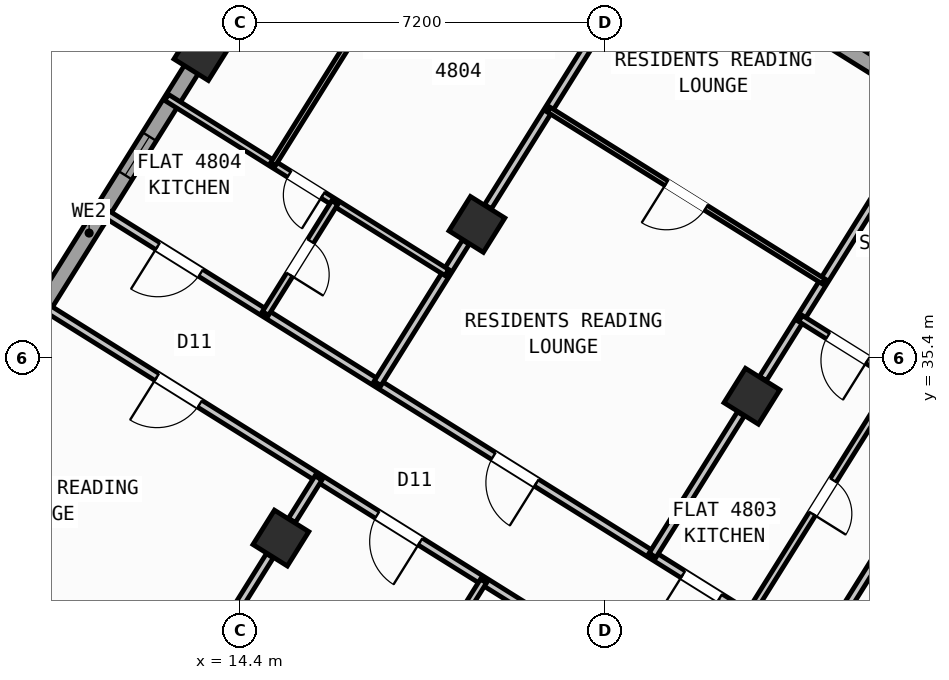
"""IFC4 building model, lengths in metres.
Left out: names, types, materials, properties, quantities, classifications, styles, units other than length and angle.
Written with IfcOpenShell. Run it as: python <this file> out.ifc"""

import sys

from ifc_helpers import new_model, si_unit, direction, frame, frame_2d, origin, origin_2d, place, context, subcontext, project, spatial, rectangle, hollow_rectangle, extrude, source, transform, mapped, element, fill, save


model = new_model("IFC4")
c1 = context("Model", 3, precision=1e-05, world=origin(), true_north=direction((0.0, 1.0)))
c2 = subcontext(c1, "Body", "Model", "MODEL_VIEW")
j1 = project(units=[si_unit("LENGTHUNIT", "METRE"), si_unit("PLANEANGLEUNIT", "RADIAN")], contexts=[c1])
p1 = place(None, origin())
s1 = spatial("IfcSite", under=j1, at=p1, CompositionType="ELEMENT")
p2 = place(p1, origin())
s2 = spatial("IfcBuilding", under=s1, at=p2, CompositionType="ELEMENT")
p3 = place(p2, frame((0.0, 0.0, 191.4)))
s3 = spatial("IfcBuildingStorey", under=s2, at=p3, CompositionType="ELEMENT", Elevation=191.4)
m1 = source(origin(), c2, "Body", "SweptSolid", [
    extrude(hollow_rectangle(XDim=0.8, YDim=0.8, WallThickness=0.032, at=origin_2d()), origin(), (0.0, 0.0, 1.0), 3.6),
])
for number, where, z_axis, x_axis in (
    (1, (24.5, 34.643, 0.0), (0.0, 0.0, 1.0), (-0.848, 0.53, 0.0)),
    (2, (19.073, 38.034, 0.0), (0.0, 0.0, 1.0), (-0.848, 0.53, 0.0)),
    (3, (15.205, 31.844, 0.0), (0.0, 0.0, 1.0), (-0.848, 0.53, 0.0)),
    (4, (13.646, 41.426, 0.0), (0.0, 0.0, 1.0), (-0.848, 0.53, 0.0)),
):
    element("IfcColumn", number, at=place(p3, frame(where, z_axis=z_axis, x_axis=x_axis)), inside=s3, PredefinedType="COLUMN", context=c2, shape_type="MappedRepresentation", body=[
        mapped(m1, transform((0.0, 0.0, 0.0), scale=1.0)),
    ])
p4 = place(p3, frame((5.7, 28.71, 0.0), z_axis=(0.0, 0.0, 1.0), x_axis=(0.529923711467, 0.8480453172, 0.0)))
e5 = element("IfcWall", 5, at=p4, inside=s3, PredefinedType="STANDARD", context=c2, shape_type="SweptSolid", body=[
    extrude(rectangle(XDim=21.587, YDim=0.32, at=frame_2d((10.794, 0.0))), origin(), (0.0, 0.0, 1.0), 2.795),
])
p5 = place(p4, frame((1.44, 0.0, 0.95)))
e6 = element("IfcOpeningElement", 6, at=p5, cuts=e5, PredefinedType="OPENING", context=c2, shape_type="SweptSolid", body=[
    extrude(rectangle(XDim=1.2, YDim=1.4, at=frame_2d((0.6, 0.7))), frame((0.0, 0.17, 0.0), z_axis=(0.0, -1.0, 0.0), x_axis=(1.0, 0.0, 0.0)), (0.0, 0.0, 1.0), 0.34),
])
p6 = place(p4, frame((4.545, 0.0, 0.85)))
e7 = element("IfcOpeningElement", 7, at=p6, cuts=e5, PredefinedType="OPENING", context=c2, shape_type="SweptSolid", body=[
    extrude(rectangle(XDim=1.8, YDim=1.5, at=frame_2d((0.9, 0.75))), frame((0.0, 0.17, 0.0), z_axis=(0.0, -1.0, 0.0), x_axis=(1.0, 0.0, 0.0)), (0.0, 0.0, 1.0), 0.34),
])
p7 = place(p4, frame((12.139, 0.0, 1.0)))
e8 = element("IfcOpeningElement", 8, at=p7, cuts=e5, PredefinedType="OPENING", context=c2, shape_type="SweptSolid", body=[
    extrude(rectangle(XDim=0.9, YDim=1.25, at=frame_2d((0.45, 0.625))), frame((0.0, 0.17, 0.0), z_axis=(0.0, -1.0, 0.0), x_axis=(1.0, 0.0, 0.0)), (0.0, 0.0, 1.0), 0.34),
])
p8 = place(p4, frame((16.35, 0.0, 0.95)))
e9 = element("IfcOpeningElement", 9, at=p8, cuts=e5, PredefinedType="OPENING", context=c2, shape_type="SweptSolid", body=[
    extrude(rectangle(XDim=1.2, YDim=1.4, at=frame_2d((0.6, 0.7))), frame((0.0, 0.17, 0.0), z_axis=(0.0, -1.0, 0.0), x_axis=(1.0, 0.0, 0.0)), (0.0, 0.0, 1.0), 0.34),
])
p9 = place(p4, frame((18.762, 0.0, 0.95)))
e10 = element("IfcOpeningElement", 10, at=p9, cuts=e5, PredefinedType="OPENING", context=c2, shape_type="SweptSolid", body=[
    extrude(rectangle(XDim=1.2, YDim=1.4, at=frame_2d((0.6, 0.7))), frame((0.0, 0.17, 0.0), z_axis=(0.0, -1.0, 0.0), x_axis=(1.0, 0.0, 0.0)), (0.0, 0.0, 1.0), 0.34),
])
p10 = place(p3, frame((17.424, 47.083, 0.0), z_axis=(0.0, 0.0, 1.0), x_axis=(0.848049927979, -0.529916332693, 0.0)))
e11 = element("IfcWall", 11, at=p10, inside=s3, PredefinedType="STANDARD", context=c2, shape_type="SweptSolid", body=[
    extrude(rectangle(XDim=29.223, YDim=0.32, at=frame_2d((14.612, 0.0))), origin(), (0.0, 0.0, 1.0), 3.32),
])
p11 = place(p10, frame((3.764, 0.0, 0.0)))
e12 = element("IfcOpeningElement", 12, at=p11, cuts=e11, PredefinedType="OPENING", context=c2, shape_type="SweptSolid", body=[
    extrude(rectangle(XDim=1.05, YDim=2.15, at=frame_2d((0.525, 1.075))), frame((0.0, 0.17, 0.0), z_axis=(0.0, -1.0, 0.0), x_axis=(1.0, 0.0, 0.0)), (0.0, 0.0, 1.0), 0.34),
])
p12 = place(p10, frame((8.344, 0.0, 0.8)))
e13 = element("IfcOpeningElement", 13, at=p12, cuts=e11, PredefinedType="OPENING", context=c2, shape_type="SweptSolid", body=[
    extrude(rectangle(XDim=2.1, YDim=1.55, at=frame_2d((1.05, 0.775))), frame((0.0, 0.17, 0.0), z_axis=(0.0, -1.0, 0.0), x_axis=(1.0, 0.0, 0.0)), (0.0, 0.0, 1.0), 0.34),
])
p13 = place(p10, frame((13.589, 0.0, 0.85)))
e14 = element("IfcOpeningElement", 14, at=p13, cuts=e11, PredefinedType="OPENING", context=c2, shape_type="SweptSolid", body=[
    extrude(rectangle(XDim=1.8, YDim=1.5, at=frame_2d((0.9, 0.75))), frame((0.0, 0.17, 0.0), z_axis=(0.0, -1.0, 0.0), x_axis=(1.0, 0.0, 0.0)), (0.0, 0.0, 1.0), 0.34),
])
p14 = place(p10, frame((17.104, 0.0, 0.95)))
e15 = element("IfcOpeningElement", 15, at=p14, cuts=e11, PredefinedType="OPENING", context=c2, shape_type="SweptSolid", body=[
    extrude(rectangle(XDim=1.2, YDim=1.4, at=frame_2d((0.6, 0.7))), frame((0.0, 0.17, 0.0), z_axis=(0.0, -1.0, 0.0), x_axis=(1.0, 0.0, 0.0)), (0.0, 0.0, 1.0), 0.34),
])
p15 = place(p10, frame((21.214, 0.0, 0.95)))
e16 = element("IfcOpeningElement", 16, at=p15, cuts=e11, PredefinedType="OPENING", context=c2, shape_type="SweptSolid", body=[
    extrude(rectangle(XDim=1.2, YDim=1.4, at=frame_2d((0.6, 0.7))), frame((0.0, 0.17, 0.0), z_axis=(0.0, -1.0, 0.0), x_axis=(1.0, 0.0, 0.0)), (0.0, 0.0, 1.0), 0.34),
])
p16 = place(p10, frame((25.853, 0.0, 0.95)))
e17 = element("IfcOpeningElement", 17, at=p16, cuts=e11, PredefinedType="OPENING", context=c2, shape_type="SweptSolid", body=[
    extrude(rectangle(XDim=1.2, YDim=1.4, at=frame_2d((0.6, 0.7))), frame((0.0, 0.17, 0.0), z_axis=(0.0, -1.0, 0.0), x_axis=(1.0, 0.0, 0.0)), (0.0, 0.0, 1.0), 0.34),
])
p17 = place(p3, frame((31.239, 38.274, 0.0), z_axis=(0.0, 0.0, 1.0), x_axis=(-0.529914125013, -0.848051307476, 0.0)))
e18 = element("IfcWall", 18, at=p17, inside=s3, PredefinedType="PARTITIONING", context=c2, shape_type="SweptSolid", body=[
    extrude(rectangle(XDim=10.35, YDim=0.16, at=frame_2d((5.175, 0.0))), origin(), (0.0, 0.0, 1.0), 3.31),
])
p18 = place(p3, frame((25.754, 29.497, 0.0), z_axis=(0.0, 0.0, 1.0), x_axis=(-0.848045850158, 0.529922858565, 0.0)))
e19 = element("IfcWall", 19, at=p18, inside=s3, PredefinedType="PARTITIONING", context=c2, shape_type="SweptSolid", body=[
    extrude(rectangle(XDim=16.73, YDim=0.16, at=frame_2d((8.365, 0.0))), origin(), (0.0, 0.0, 1.0), 3.31),
])
p19 = place(p18, frame((2.22, 0.0, 0.0)))
e20 = element("IfcOpeningElement", 20, at=p19, cuts=e19, PredefinedType="OPENING", context=c2, shape_type="SweptSolid", body=[
    extrude(rectangle(XDim=0.86, YDim=2.05, at=frame_2d((0.43, 1.025))), frame((0.0, 0.09, 0.0), z_axis=(0.0, -1.0, 0.0), x_axis=(1.0, 0.0, 0.0)), (0.0, 0.0, 1.0), 0.18),
])
p20 = place(p18, frame((6.49, 0.0, 0.0)))
e21 = element("IfcOpeningElement", 21, at=p20, cuts=e19, PredefinedType="OPENING", context=c2, shape_type="SweptSolid", body=[
    extrude(rectangle(XDim=1.0, YDim=2.1, at=frame_2d((0.5, 1.05))), frame((0.0, 0.09, 0.0), z_axis=(0.0, -1.0, 0.0), x_axis=(1.0, 0.0, 0.0)), (0.0, 0.0, 1.0), 0.18),
])
p21 = place(p18, frame((14.304, 0.0, 0.0)))
e22 = element("IfcOpeningElement", 22, at=p21, cuts=e19, PredefinedType="OPENING", context=c2, shape_type="SweptSolid", body=[
    extrude(rectangle(XDim=1.0, YDim=2.1, at=frame_2d((0.5, 1.05))), frame((0.0, 0.09, 0.0), z_axis=(0.0, -1.0, 0.0), x_axis=(1.0, 0.0, 0.0)), (0.0, 0.0, 1.0), 0.18),
])
p22 = place(p3, frame((24.588, 27.631, 0.0), z_axis=(0.0, 0.0, 1.0), x_axis=(-0.848041752158, 0.529929416617, 0.0)))
e23 = element("IfcWall", 23, at=p22, inside=s3, PredefinedType="PARTITIONING", context=c2, shape_type="SweptSolid", body=[
    extrude(rectangle(XDim=16.73, YDim=0.16, at=frame_2d((8.365, 0.0))), origin(), (0.0, 0.0, 1.0), 3.31),
])
p23 = place(p22, frame((2.22, 0.0, 0.0)))
e24 = element("IfcOpeningElement", 24, at=p23, cuts=e23, PredefinedType="OPENING", context=c2, shape_type="SweptSolid", body=[
    extrude(rectangle(XDim=0.86, YDim=2.05, at=frame_2d((0.43, 1.025))), frame((0.0, 0.09, 0.0), z_axis=(0.0, -1.0, 0.0), x_axis=(1.0, 0.0, 0.0)), (0.0, 0.0, 1.0), 0.18),
])
p24 = place(p22, frame((7.82, 0.0, 0.0)))
e25 = element("IfcOpeningElement", 25, at=p24, cuts=e23, PredefinedType="OPENING", context=c2, shape_type="SweptSolid", body=[
    extrude(rectangle(XDim=1.0, YDim=2.1, at=frame_2d((0.5, 1.05))), frame((0.0, 0.09, 0.0), z_axis=(0.0, -1.0, 0.0), x_axis=(1.0, 0.0, 0.0)), (0.0, 0.0, 1.0), 0.18),
])
p25 = place(p22, frame((12.95, 0.0, 0.0)))
e26 = element("IfcOpeningElement", 26, at=p25, cuts=e23, PredefinedType="OPENING", context=c2, shape_type="SweptSolid", body=[
    extrude(rectangle(XDim=1.0, YDim=2.1, at=frame_2d((0.5, 1.05))), frame((0.0, 0.09, 0.0), z_axis=(0.0, -1.0, 0.0), x_axis=(1.0, 0.0, 0.0)), (0.0, 0.0, 1.0), 0.18),
])
p26 = place(p3, frame((15.946, 33.031, 0.0), z_axis=(0.0, 0.0, 1.0), x_axis=(-0.529821225456, -0.848109349704, 0.0)))
e27 = element("IfcWall", 27, at=p26, inside=s3, PredefinedType="PARTITIONING", context=c2, shape_type="SweptSolid", body=[
    extrude(rectangle(XDim=0.988, YDim=0.16, at=frame_2d((0.494, 0.0))), origin(), (0.0, 0.0, 1.0), 2.795),
])
p27 = place(p3, frame((14.986, 31.494, 0.0), z_axis=(0.0, 0.0, 1.0), x_axis=(-0.529907440938, -0.848055484057, 0.0)))
e28 = element("IfcWall", 28, at=p27, inside=s3, PredefinedType="PARTITIONING", context=c2, shape_type="SweptSolid", body=[
    extrude(rectangle(XDim=6.476, YDim=0.16, at=frame_2d((3.238, 0.0))), origin(), (0.0, 0.0, 1.0), 2.795),
])
p28 = place(p3, frame((19.203, 30.996, 0.0), z_axis=(0.0, 0.0, 1.0), x_axis=(-0.529906983049, -0.848055770169, 0.0)))
e29 = element("IfcWall", 29, at=p28, inside=s3, PredefinedType="PLUMBINGWALL", context=c2, shape_type="SweptSolid", body=[
    extrude(rectangle(XDim=3.58, YDim=0.14, at=frame_2d((1.79, 0.0))), origin(), (0.0, 0.0, 1.0), 3.31),
])
p29 = place(p28, frame((1.4, 0.0, 0.0)))
e30 = element("IfcOpeningElement", 30, at=p29, cuts=e29, PredefinedType="OPENING", context=c2, shape_type="SweptSolid", body=[
    extrude(rectangle(XDim=0.78, YDim=2.05, at=frame_2d((0.39, 1.025))), frame((0.0, 0.08, 0.0), z_axis=(0.0, -1.0, 0.0), x_axis=(1.0, 0.0, 0.0)), (0.0, 0.0, 1.0), 0.16),
])
p30 = place(p3, frame((12.951, 28.238, 0.0), z_axis=(0.0, 0.0, 1.0), x_axis=(-0.848031959833, 0.529945086874, 0.0)))
e31 = element("IfcWall", 31, at=p30, inside=s3, PredefinedType="PARTITIONING", context=c2, shape_type="SweptSolid", body=[
    extrude(rectangle(XDim=6.52, YDim=0.11, at=frame_2d((3.26, 0.0))), origin(), (0.0, 0.0, 1.0), 3.31),
])
p31 = place(p30, frame((2.8, 0.0, 0.0)))
e32 = element("IfcOpeningElement", 32, at=p31, cuts=e31, PredefinedType="OPENING", context=c2, shape_type="SweptSolid", body=[
    extrude(rectangle(XDim=0.92, YDim=2.08, at=frame_2d((0.46, 1.04))), frame((0.0, 0.065, 0.0), z_axis=(0.0, -1.0, 0.0), x_axis=(1.0, 0.0, 0.0)), (0.0, 0.0, 1.0), 0.13),
])
p32 = place(p3, frame((27.634, 39.657, 0.0), z_axis=(0.0, 0.0, 1.0), x_axis=(-0.529899205623, -0.848060629837, 0.0)))
e33 = element("IfcWall", 33, at=p32, inside=s3, PredefinedType="PARTITIONING", context=c2, shape_type="SweptSolid", body=[
    extrude(rectangle(XDim=5.501, YDim=0.16, at=frame_2d((2.75, 0.0))), origin(), (0.0, 0.0, 1.0), 2.795),
])
p33 = place(p3, frame((24.282, 34.293, 0.0), z_axis=(0.0, 0.0, 1.0), x_axis=(-0.529938869374, -0.84803584519, 0.0)))
e34 = element("IfcWall", 34, at=p33, inside=s3, PredefinedType="PARTITIONING", context=c2, shape_type="SweptSolid", body=[
    extrude(rectangle(XDim=3.288, YDim=0.16, at=frame_2d((1.644, 0.0))), origin(), (0.0, 0.0, 1.0), 2.795),
])
p34 = place(p3, frame((28.674, 34.169, 0.0), z_axis=(0.0, 0.0, 1.0), x_axis=(-0.848059820872, 0.529900500304, 0.0)))
e35 = element("IfcWall", 35, at=p34, inside=s3, PredefinedType="PLUMBINGWALL", context=c2, shape_type="SweptSolid", body=[
    extrude(rectangle(XDim=3.79, YDim=0.14, at=frame_2d((1.895, 0.0))), origin(), (0.0, 0.0, 1.0), 3.31),
])
p35 = place(p34, frame((2.23, 0.0, 0.0)))
e36 = element("IfcOpeningElement", 36, at=p35, cuts=e35, PredefinedType="OPENING", context=c2, shape_type="SweptSolid", body=[
    extrude(rectangle(XDim=0.92, YDim=2.08, at=frame_2d((0.46, 1.04))), frame((0.0, 0.08, 0.0), z_axis=(0.0, -1.0, 0.0), x_axis=(1.0, 0.0, 0.0)), (0.0, 0.0, 1.0), 0.16),
])
p36 = place(p3, frame((27.359, 34.991, 0.0), z_axis=(0.0, 0.0, 1.0), x_axis=(-0.529907329021, -0.848055553988, 0.0)))
e37 = element("IfcWall", 37, at=p36, inside=s3, PredefinedType="PLUMBINGWALL", context=c2, shape_type="SweptSolid", body=[
    extrude(rectangle(XDim=5.51, YDim=0.14, at=frame_2d((2.755, 0.0))), origin(), (0.0, 0.0, 1.0), 2.935),
])
p37 = place(p36, frame((2.365, 0.0, 0.0)))
e38 = element("IfcOpeningElement", 38, at=p37, cuts=e37, PredefinedType="OPENING", context=c2, shape_type="SweptSolid", body=[
    extrude(rectangle(XDim=0.78, YDim=2.05, at=frame_2d((0.39, 1.025))), frame((0.0, 0.08, 0.0), z_axis=(0.0, -1.0, 0.0), x_axis=(1.0, 0.0, 0.0)), (0.0, 0.0, 1.0), 0.16),
])
p38 = place(p3, frame((22.206, 43.049, 0.0), z_axis=(0.0, 0.0, 1.0), x_axis=(-0.529919150083, -0.848048167486, 0.0)))
e39 = element("IfcWall", 39, at=p38, inside=s3, PredefinedType="PARTITIONING", context=c2, shape_type="SweptSolid", body=[
    extrude(rectangle(XDim=5.501, YDim=0.16, at=frame_2d((2.75, 0.0))), origin(), (0.0, 0.0, 1.0), 2.795),
])
p39 = place(p3, frame((18.854, 37.685, 0.0), z_axis=(0.0, 0.0, 1.0), x_axis=(-0.529885466561, -0.848069214349, 0.0)))
e40 = element("IfcWall", 40, at=p39, inside=s3, PredefinedType="PARTITIONING", context=c2, shape_type="SweptSolid", body=[
    extrude(rectangle(XDim=3.288, YDim=0.16, at=frame_2d((1.644, 0.0))), origin(), (0.0, 0.0, 1.0), 2.795),
])
p40 = place(p3, frame((25.916, 36.909, 0.0), z_axis=(0.0, 0.0, 1.0), x_axis=(-0.848056163074, 0.529906354247, 0.0)))
e41 = element("IfcWall", 41, at=p40, inside=s3, PredefinedType="PARTITIONING", context=c2, shape_type="SweptSolid", body=[
    extrude(rectangle(XDim=6.4, YDim=0.11, at=frame_2d((3.2, 0.0))), origin(), (0.0, 0.0, 1.0), 3.31),
])
p41 = place(p40, frame((2.74, 0.0, 0.0)))
e42 = element("IfcOpeningElement", 42, at=p41, cuts=e41, PredefinedType="OPENING", context=c2, shape_type="SweptSolid", body=[
    extrude(rectangle(XDim=0.92, YDim=2.08, at=frame_2d((0.46, 1.04))), frame((0.0, 0.065, 0.0), z_axis=(0.0, -1.0, 0.0), x_axis=(1.0, 0.0, 0.0)), (0.0, 0.0, 1.0), 0.13),
])
p42 = place(p3, frame((18.479, 37.084, 0.0), z_axis=(0.0, 0.0, 1.0), x_axis=(-0.848048787466, 0.529918157905, 0.0)))
e43 = element("IfcWall", 43, at=p42, inside=s3, PredefinedType="PLUMBINGWALL", context=c2, shape_type="SweptSolid", body=[
    extrude(rectangle(XDim=6.52, YDim=0.14, at=frame_2d((3.26, 0.0))), origin(), (0.0, 0.0, 1.0), 3.31),
])
p43 = place(p42, frame((2.885, 0.0, 0.0)))
e44 = element("IfcOpeningElement", 44, at=p43, cuts=e43, PredefinedType="OPENING", context=c2, shape_type="SweptSolid", body=[
    extrude(rectangle(XDim=0.78, YDim=2.05, at=frame_2d((0.39, 1.025))), frame((0.0, 0.08, 0.0), z_axis=(0.0, -1.0, 0.0), x_axis=(1.0, 0.0, 0.0)), (0.0, 0.0, 1.0), 0.16),
])
p44 = place(p3, frame((16.268, 38.467, 0.0), z_axis=(0.0, 0.0, 1.0), x_axis=(-0.529913878929, -0.848051461244, 0.0)))
e45 = element("IfcWall", 45, at=p44, inside=s3, PredefinedType="PLUMBINGWALL", context=c2, shape_type="SweptSolid", body=[
    extrude(rectangle(XDim=2.58, YDim=0.14, at=frame_2d((1.29, 0.0))), origin(), (0.0, 0.0, 1.0), 3.31),
])
p45 = place(p44, frame((0.9, 0.0, 0.0)))
e46 = element("IfcOpeningElement", 46, at=p45, cuts=e45, PredefinedType="OPENING", context=c2, shape_type="SweptSolid", body=[
    extrude(rectangle(XDim=0.78, YDim=2.05, at=frame_2d((0.39, 1.025))), frame((0.0, 0.08, 0.0), z_axis=(0.0, -1.0, 0.0), x_axis=(1.0, 0.0, 0.0)), (0.0, 0.0, 1.0), 0.16),
])
p46 = place(p3, frame((19.312, 46.045, 0.0), z_axis=(0.0, 0.0, 1.0), x_axis=(-0.529933431478, -0.848039243315, 0.0)))
e47 = element("IfcWall", 47, at=p46, inside=s3, PredefinedType="PARTITIONING", context=c2, shape_type="SweptSolid", body=[
    extrude(rectangle(XDim=8.04, YDim=0.11, at=frame_2d((4.02, 0.0))), origin(), (0.0, 0.0, 1.0), 2.935),
])
p47 = place(p46, frame((0.47, 0.0, 0.0)))
e48 = element("IfcOpeningElement", 48, at=p47, cuts=e47, PredefinedType="OPENING", context=c2, shape_type="SweptSolid", body=[
    extrude(rectangle(XDim=0.92, YDim=2.08, at=frame_2d((0.46, 1.04))), frame((0.0, 0.065, 0.0), z_axis=(0.0, -1.0, 0.0), x_axis=(1.0, 0.0, 0.0)), (0.0, 0.0, 1.0), 0.13),
])
m2 = source(origin(), c2, "Body", "SweptSolid", [
    extrude(rectangle(XDim=0.9, YDim=1.25, at=frame_2d((0.45, 0.625))), frame((0.0, 0.03, 0.0), z_axis=(0.0, -1.0, 0.0), x_axis=(1.0, 0.0, 0.0)), (0.0, 0.0, 1.0), 0.06),
])
p48 = place(p7, origin())
e49 = element("IfcWindow", 49, at=p48, inside=s3, PartitioningType="SINGLE_PANEL", PredefinedType="WINDOW", context=c2, shape_type="MappedRepresentation", body=[
    mapped(m2, transform((0.0, 0.0, 0.0), scale=1.0)),
])
fill(e8, e49)
m3 = source(origin(), c2, "Body", "SweptSolid", [
    extrude(rectangle(XDim=1.0, YDim=2.1, at=frame_2d((0.5, 1.05))), frame((0.0, 0.025, 0.0), z_axis=(0.0, -1.0, 0.0), x_axis=(1.0, 0.0, 0.0)), (0.0, 0.0, 1.0), 0.05),
])
p49 = place(p24, origin())
e50 = element("IfcDoor", 50, at=p49, inside=s3, OperationType="SINGLE_SWING_LEFT", PredefinedType="DOOR", context=c2, shape_type="MappedRepresentation", body=[
    mapped(m3, transform((0.0, 0.0, 0.0), scale=1.0)),
])
fill(e25, e50)
p50 = place(p25, origin())
e51 = element("IfcDoor", 51, at=p50, inside=s3, OperationType="SINGLE_SWING_RIGHT", PredefinedType="DOOR", context=c2, shape_type="MappedRepresentation", body=[
    mapped(m3, transform((0.0, 0.0, 0.0), scale=1.0)),
])
fill(e26, e51)
m4 = source(origin(), c2, "Body", "SweptSolid", [
    extrude(rectangle(XDim=0.86, YDim=2.05, at=frame_2d((0.43, 1.025))), frame((0.0, 0.025, 0.0), z_axis=(0.0, -1.0, 0.0), x_axis=(1.0, 0.0, 0.0)), (0.0, 0.0, 1.0), 0.05),
])
p51 = place(p19, origin())
e52 = element("IfcDoor", 52, at=p51, inside=s3, OperationType="SINGLE_SWING_RIGHT", PredefinedType="DOOR", context=c2, shape_type="MappedRepresentation", body=[
    mapped(m4, transform((0.0, 0.0, 0.0), scale=1.0)),
])
fill(e20, e52)
m5 = source(origin(), c2, "Body", "SweptSolid", [
    extrude(rectangle(XDim=0.92, YDim=2.08, at=frame_2d((0.46, 1.04))), frame((0.0, 0.025, 0.0), z_axis=(0.0, -1.0, 0.0), x_axis=(1.0, 0.0, 0.0)), (0.0, 0.0, 1.0), 0.05),
])
p52 = place(p35, origin())
e53 = element("IfcDoor", 53, at=p52, inside=s3, OperationType="SINGLE_SWING_LEFT", PredefinedType="DOOR", context=c2, shape_type="MappedRepresentation", body=[
    mapped(m5, transform((0.0, 0.0, 0.0), scale=1.0)),
])
fill(e36, e53)
m6 = source(origin(), c2, "Body", "SweptSolid", [
    extrude(rectangle(XDim=0.78, YDim=2.05, at=frame_2d((0.39, 1.025))), frame((0.0, 0.025, 0.0), z_axis=(0.0, -1.0, 0.0), x_axis=(1.0, 0.0, 0.0)), (0.0, 0.0, 1.0), 0.05),
])
p53 = place(p37, origin())
e54 = element("IfcDoor", 54, at=p53, inside=s3, OperationType="SINGLE_SWING_RIGHT", PredefinedType="DOOR", context=c2, shape_type="MappedRepresentation", body=[
    mapped(m6, transform((0.0, 0.0, 0.0), scale=1.0)),
])
fill(e38, e54)
p54 = place(p20, origin())
e55 = element("IfcDoor", 55, at=p54, inside=s3, OperationType="SINGLE_SWING_LEFT", PredefinedType="DOOR", context=c2, shape_type="MappedRepresentation", body=[
    mapped(m3, transform((0.0, 0.0, 0.0), scale=1.0)),
])
fill(e21, e55)
p55 = place(p41, origin())
e56 = element("IfcDoor", 56, at=p55, inside=s3, OperationType="SINGLE_SWING_RIGHT", PredefinedType="DOOR", context=c2, shape_type="MappedRepresentation", body=[
    mapped(m5, transform((0.0, 0.0, 0.0), scale=1.0)),
])
fill(e42, e56)
p56 = place(p21, origin())
e57 = element("IfcDoor", 57, at=p56, inside=s3, OperationType="SINGLE_SWING_RIGHT", PredefinedType="DOOR", context=c2, shape_type="MappedRepresentation", body=[
    mapped(m3, transform((0.0, 0.0, 0.0), scale=1.0)),
])
fill(e22, e57)
p57 = place(p43, origin())
e58 = element("IfcDoor", 58, at=p57, inside=s3, OperationType="SINGLE_SWING_LEFT", PredefinedType="DOOR", context=c2, shape_type="MappedRepresentation", body=[
    mapped(m6, transform((0.0, 0.0, 0.0), scale=1.0)),
])
fill(e44, e58)
p58 = place(p45, origin())
e59 = element("IfcDoor", 59, at=p58, inside=s3, OperationType="SINGLE_SWING_RIGHT", PredefinedType="DOOR", context=c2, shape_type="MappedRepresentation", body=[
    mapped(m6, transform((0.0, 0.0, 0.0), scale=1.0)),
])
fill(e46, e59)
save(model, sys.argv[1])
